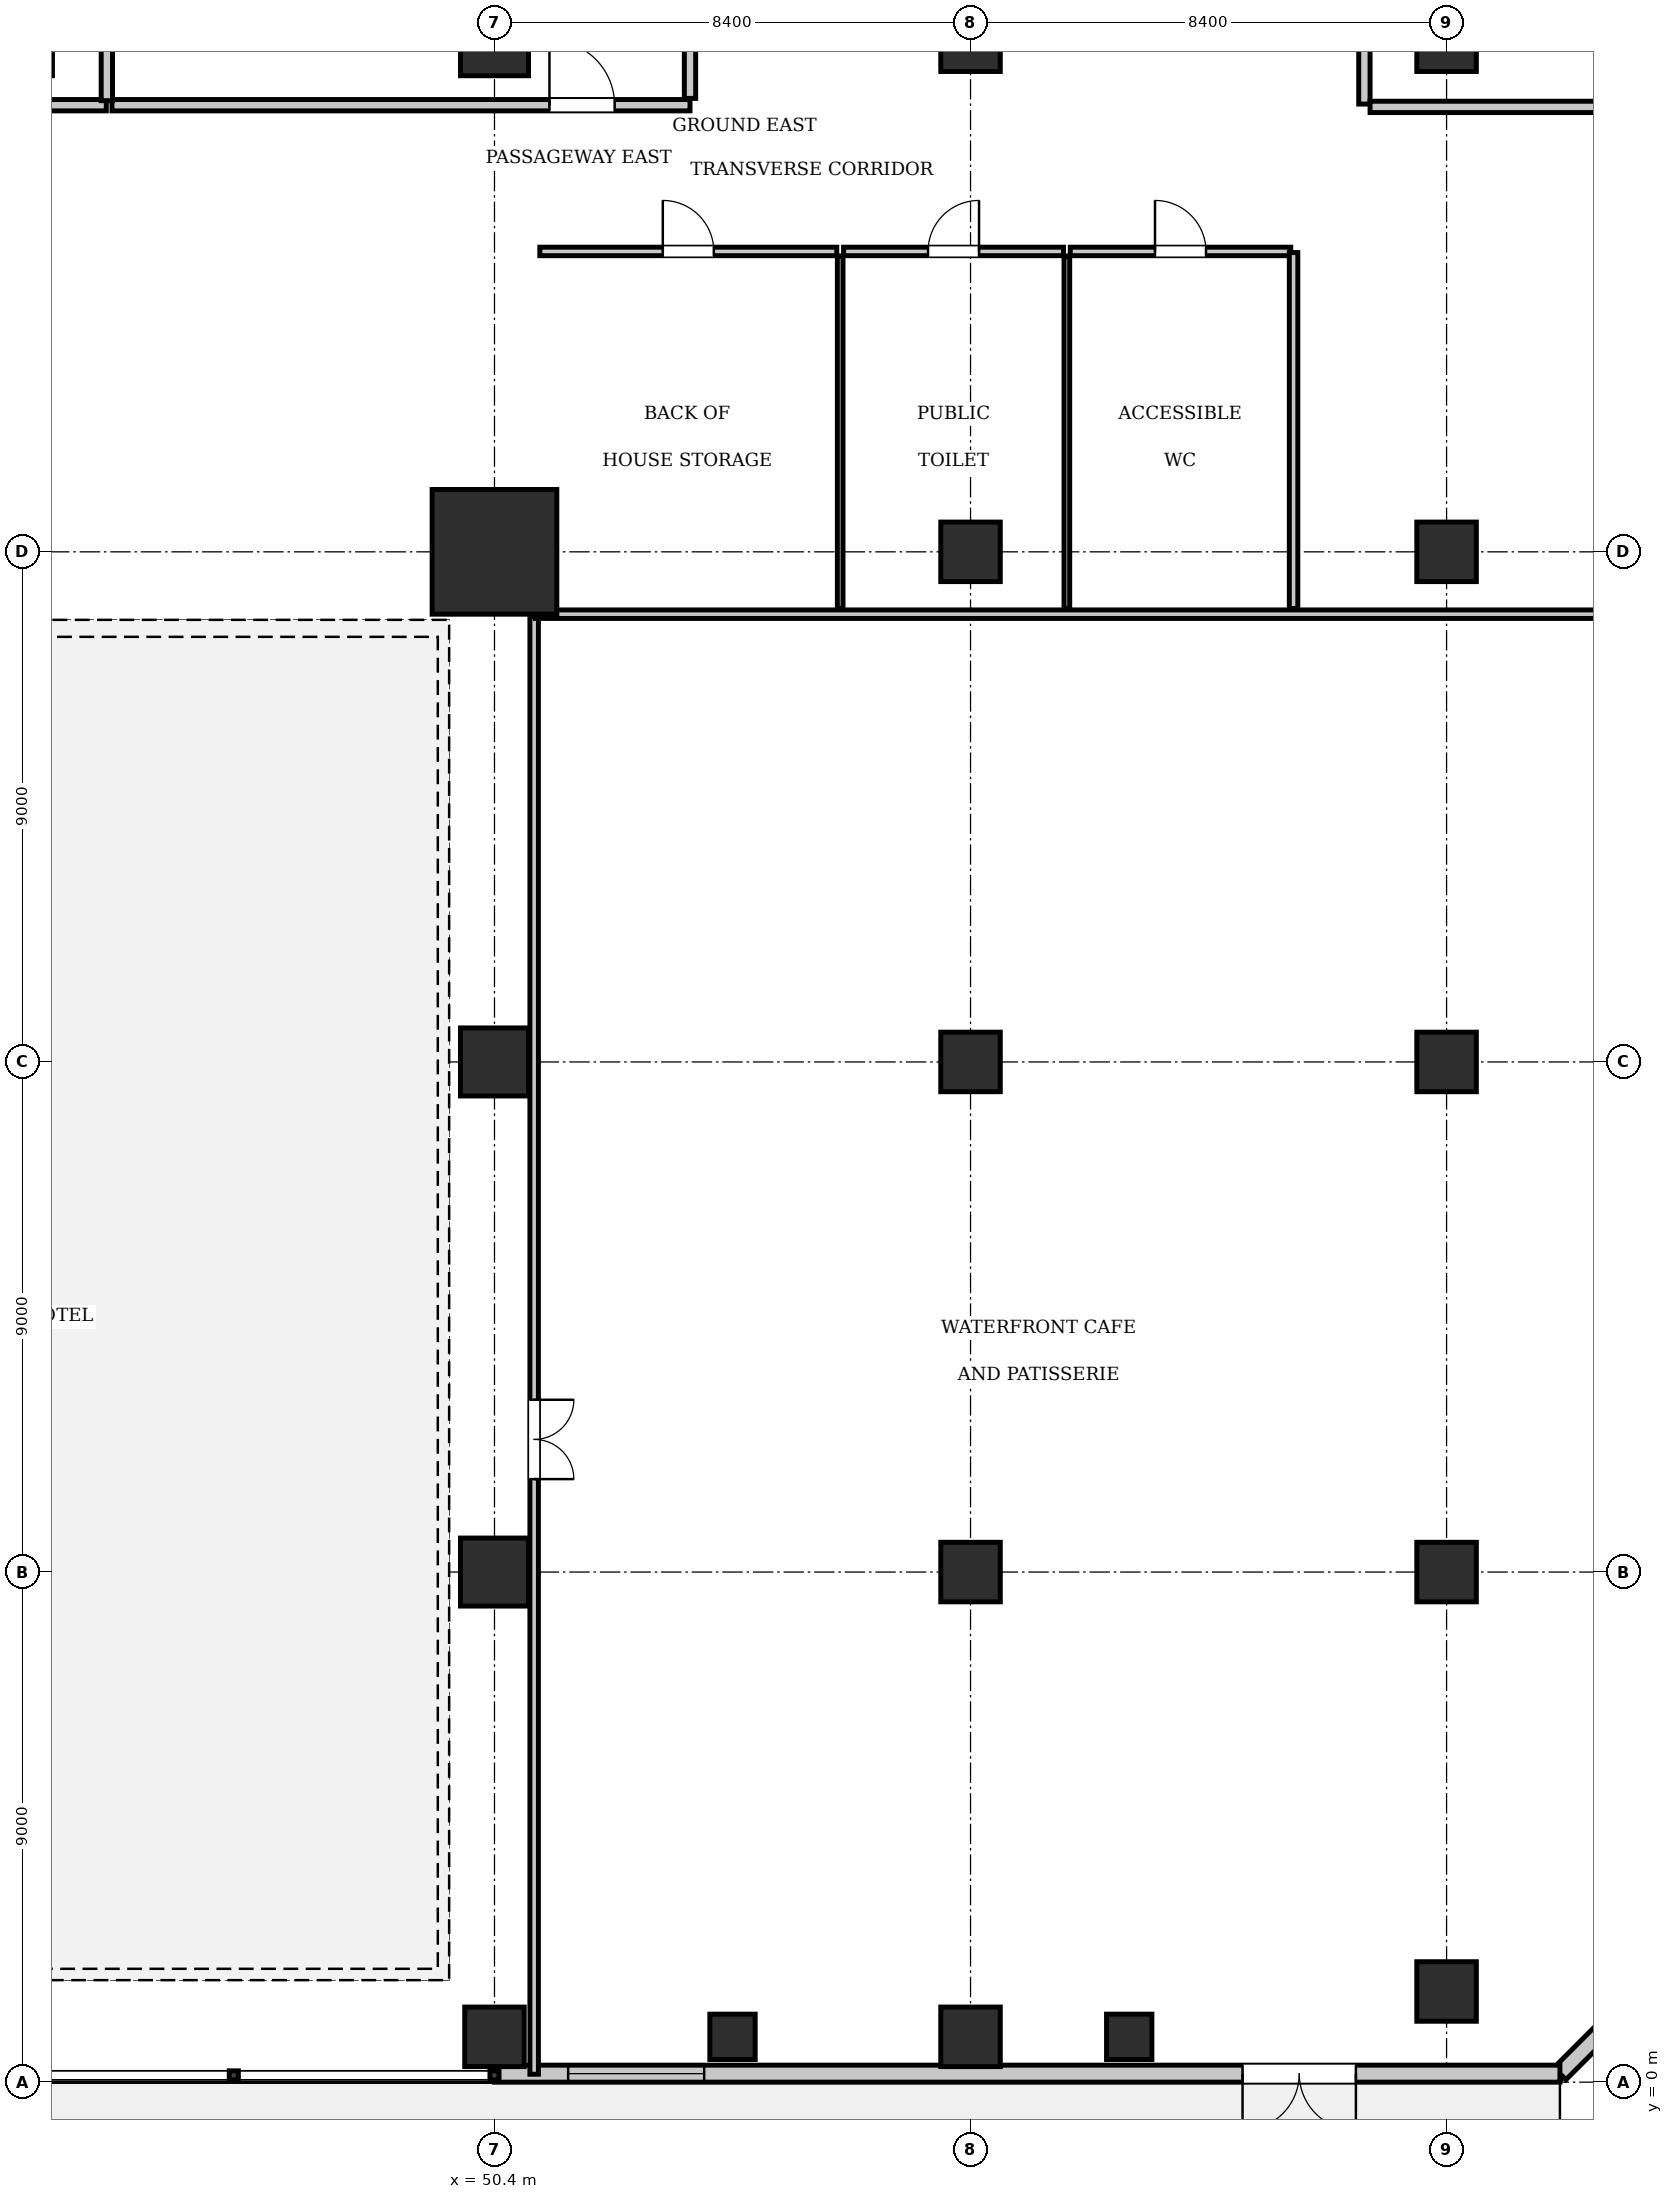
"""IFC4 building model, lengths in metres.
Left out: names, types, materials, properties, quantities, classifications, styles, units other than length and angle.
Written with IfcOpenShell. Run it as: python <this file> out.ifc"""

import sys

from ifc_helpers import new_model, si_unit, direction, frame, frame_2d, origin, origin_2d, place, context, subcontext, project, spatial, rectangle, extrude, element, fill, save


model = new_model("IFC4")
c1 = context("Model", 3, precision=1e-05, world=origin(), true_north=direction((0.0, 1.0)))
c2 = subcontext(c1, "Body", "Model", "MODEL_VIEW")
j1 = project(units=[si_unit("LENGTHUNIT", "METRE"), si_unit("PLANEANGLEUNIT", "RADIAN")], contexts=[c1])
p1 = place(None, origin())
s1 = spatial("IfcSite", under=j1, at=p1, CompositionType="ELEMENT")
p2 = place(p1, origin())
s2 = spatial("IfcBuilding", under=s1, at=p2, CompositionType="ELEMENT")
p3 = place(p2, origin())
s3 = spatial("IfcBuildingStorey", under=s2, at=p3, CompositionType="ELEMENT", Elevation=0.0)
p4 = place(p3, frame((50.4, 27.0, 0.0), z_axis=(0.0, 0.0, 1.0), x_axis=(1.0, 0.0, 0.0)))
e1 = element("IfcColumn", 1, at=p4, inside=s3, PredefinedType="COLUMN", context=c2, shape_type="SweptSolid", body=[
    extrude(rectangle(XDim=2.2, YDim=2.2, at=origin_2d()), origin(), (0.0, 0.0, 1.0), 5.6),
])
for number, where, z_axis, x_axis in (
    (2, (50.4, 36.0, 0.0), (0.0, 0.0, 1.0), (1.0, 0.0, 0.0)),
    (3, (50.4, 18.0, 0.0), (0.0, 0.0, 1.0), (1.0, 0.0, 0.0)),
    (4, (50.4, 9.0, 0.0), (0.0, 0.0, 1.0), (1.0, 0.0, 0.0)),
):
    element("IfcColumn", number, at=place(p3, frame(where, z_axis=z_axis, x_axis=x_axis)), inside=s3, PredefinedType="COLUMN", context=c2, shape_type="SweptSolid", body=[
        extrude(rectangle(XDim=1.2, YDim=1.2, at=origin_2d()), origin(), (0.0, 0.0, 1.0), 5.6),
    ])
for number, where, z_axis, x_axis in (
    (5, (58.8, 9.0, 0.0), (0.0, 0.0, 1.0), (1.0, 0.0, 0.0)),
    (6, (58.8, 18.0, 0.0), (0.0, 0.0, 1.0), (1.0, 0.0, 0.0)),
    (7, (58.8, 27.0, 0.0), (0.0, 0.0, 1.0), (1.0, 0.0, 0.0)),
    (8, (58.8, 36.0, 0.0), (0.0, 0.0, 1.0), (1.0, 0.0, 0.0)),
    (9, (67.2, 1.6, 0.0), (0.0, 0.0, 1.0), (1.0, 0.0, 0.0)),
    (10, (67.2, 9.0, 0.0), (0.0, 0.0, 1.0), (1.0, 0.0, 0.0)),
    (11, (67.2, 18.0, 0.0), (0.0, 0.0, 1.0), (1.0, 0.0, 0.0)),
    (12, (67.2, 27.0, 0.0), (0.0, 0.0, 1.0), (1.0, 0.0, 0.0)),
    (13, (67.2, 36.0, 0.0), (0.0, 0.0, 1.0), (1.0, 0.0, 0.0)),
    (14, (50.4, 0.8, 0.0), (0.0, 0.0, 1.0), (1.0, 0.0, 0.0)),
    (15, (58.8, 0.8, 0.0), (0.0, 0.0, 1.0), (1.0, 0.0, 0.0)),
):
    element("IfcColumn", number, at=place(p3, frame(where, z_axis=z_axis, x_axis=x_axis)), inside=s3, PredefinedType="COLUMN", context=c2, shape_type="SweptSolid", body=[
        extrude(rectangle(XDim=1.05, YDim=1.05, at=origin_2d()), origin(), (0.0, 0.0, 1.0), 5.6),
    ])
for number, where, z_axis, x_axis in (
    (16, (54.6, 0.8, 0.0), (0.0, 0.0, 1.0), (1.0, 0.0, 0.0)),
    (17, (61.6, 0.8, 0.0), (0.0, 0.0, 1.0), (1.0, 0.0, 0.0)),
):
    element("IfcColumn", number, at=place(p3, frame(where, z_axis=z_axis, x_axis=x_axis)), inside=s3, PredefinedType="PILASTER", context=c2, shape_type="SweptSolid", body=[
        extrude(rectangle(XDim=0.8, YDim=0.8, at=origin_2d()), origin(), (0.0, 0.0, 1.0), 5.6),
    ])
p5 = place(p3, frame((69.2, 0.15, 0.0), z_axis=(0.0, 0.0, 1.0), x_axis=(0.707106781187, 0.707106781187, 0.0)))
e18 = element("IfcWall", 18, at=p5, inside=s3, PredefinedType="SOLIDWALL", context=c2, shape_type="SweptSolid", body=[
    extrude(rectangle(XDim=8.839, YDim=0.3, at=frame_2d((4.419, 0.0))), origin(), (0.0, 0.0, 1.0), 5.32),
])
p6 = place(p5, frame((3.2, 0.0, 0.9)))
e19 = element("IfcOpeningElement", 19, at=p6, cuts=e18, PredefinedType="OPENING", context=c2, shape_type="SweptSolid", body=[
    extrude(rectangle(XDim=2.4, YDim=2.6, at=frame_2d((1.2, 1.3))), frame((0.0, 0.16, 0.0), z_axis=(0.0, -1.0, 0.0), x_axis=(1.0, 0.0, 0.0)), (0.0, 0.0, 1.0), 0.32),
])
p7 = place(p3, frame((69.2, 0.15, 0.0), z_axis=(0.0, 0.0, 1.0), x_axis=(-1.0, 0.0, 0.0)))
e20 = element("IfcWall", 20, at=p7, inside=s3, PredefinedType="SOLIDWALL", context=c2, shape_type="SweptSolid", body=[
    extrude(rectangle(XDim=18.8, YDim=0.3, at=frame_2d((9.4, 0.0))), origin(), (0.0, 0.0, 1.0), 5.32),
])
p8 = place(p7, frame((3.6, 0.0, 0.0)))
e21 = element("IfcOpeningElement", 21, at=p8, cuts=e20, PredefinedType="OPENING", context=c2, shape_type="SweptSolid", body=[
    extrude(rectangle(XDim=2.0, YDim=2.4, at=frame_2d((1.0, 1.2))), frame((0.0, 0.16, 0.0), z_axis=(0.0, -1.0, 0.0), x_axis=(1.0, 0.0, 0.0)), (0.0, 0.0, 1.0), 0.32),
])
p9 = place(p7, frame((15.1, 0.0, 0.9)))
e22 = element("IfcOpeningElement", 22, at=p9, cuts=e20, PredefinedType="OPENING", context=c2, shape_type="SweptSolid", body=[
    extrude(rectangle(XDim=2.4, YDim=2.6, at=frame_2d((1.2, 1.3))), frame((0.0, 0.16, 0.0), z_axis=(0.0, -1.0, 0.0), x_axis=(1.0, 0.0, 0.0)), (0.0, 0.0, 1.0), 0.32),
])
p10 = place(p3, frame((43.65, 34.88, 0.0), z_axis=(0.0, 0.0, 1.0), x_axis=(1.0, 0.0, 0.0)))
e23 = element("IfcWall", 23, at=p10, inside=s3, PredefinedType="PARTITIONING", context=c2, shape_type="SweptSolid", body=[
    extrude(rectangle(XDim=10.2, YDim=0.2, at=frame_2d((5.1, 0.0))), origin(), (0.0, 0.0, 1.0), 5.32),
])
p11 = place(p10, frame((7.72, 0.0, 0.0)))
e24 = element("IfcOpeningElement", 24, at=p11, cuts=e23, PredefinedType="OPENING", context=c2, shape_type="SweptSolid", body=[
    extrude(rectangle(XDim=1.15, YDim=2.15, at=frame_2d((0.575, 1.075))), frame((0.0, 0.11, 0.0), z_axis=(0.0, -1.0, 0.0), x_axis=(1.0, 0.0, 0.0)), (0.0, 0.0, 1.0), 0.22),
])
p12 = place(p3, frame((53.85, 35.0, 0.0), z_axis=(0.0, 0.0, 1.0), x_axis=(0.0, 1.0, 0.0)))
e25 = element("IfcWall", 25, at=p12, inside=s3, PredefinedType="PARTITIONING", context=c2, shape_type="SweptSolid", body=[
    extrude(rectangle(XDim=18.7, YDim=0.2, at=frame_2d((9.35, 0.0))), origin(), (0.0, 0.0, 1.0), 5.32),
])
p13 = place(p3, frame((40.4, 34.88, 0.0), z_axis=(0.0, 0.0, 1.0), x_axis=(1.0, 0.0, 0.0)))
e26 = element("IfcWall", 26, at=p13, inside=s3, PredefinedType="PARTITIONING", context=c2, shape_type="SweptSolid", body=[
    extrude(rectangle(XDim=3.15, YDim=0.2, at=frame_2d((1.575, 0.0))), origin(), (0.0, 0.0, 1.0), 5.32),
])
p14 = place(p3, frame((43.56, 34.96, 0.0), z_axis=(0.0, 0.0, 1.0), x_axis=(0.0, 1.0, 0.0)))
e27 = element("IfcWall", 27, at=p14, inside=s3, PredefinedType="PARTITIONING", context=c2, shape_type="SweptSolid", body=[
    extrude(rectangle(XDim=3.16, YDim=0.2, at=frame_2d((1.58, 0.0))), origin(), (0.0, 0.0, 1.0), 5.32),
])
p15 = place(p14, frame((1.67, 0.0, 0.0)))
e28 = element("IfcOpeningElement", 28, at=p15, cuts=e27, PredefinedType="OPENING", context=c2, shape_type="SweptSolid", body=[
    extrude(rectangle(XDim=1.15, YDim=2.15, at=frame_2d((0.575, 1.075))), frame((0.0, 0.11, 0.0), z_axis=(0.0, -1.0, 0.0), x_axis=(1.0, 0.0, 0.0)), (0.0, 0.0, 1.0), 0.22),
])
p16 = place(p3, frame((51.1, 0.14, 0.0), z_axis=(0.0, 0.0, 1.0), x_axis=(0.0, 1.0, 0.0)))
e29 = element("IfcWall", 29, at=p16, inside=s3, PredefinedType="PARTITIONING", context=c2, shape_type="SweptSolid", body=[
    extrude(rectangle(XDim=25.72, YDim=0.15, at=frame_2d((12.86, 0.0))), origin(), (0.0, 0.0, 1.0), 5.32),
])
p17 = place(p16, frame((10.5, 0.0, 0.0)))
e30 = element("IfcOpeningElement", 30, at=p17, cuts=e29, PredefinedType="OPENING", context=c2, shape_type="SweptSolid", body=[
    extrude(rectangle(XDim=1.4, YDim=2.2, at=frame_2d((0.7, 1.1))), frame((0.0, 0.085, 0.0), z_axis=(0.0, -1.0, 0.0), x_axis=(1.0, 0.0, 0.0)), (0.0, 0.0, 1.0), 0.17),
])
p18 = place(p3, frame((51.12, 25.9, 0.0), z_axis=(0.0, 0.0, 1.0), x_axis=(1.0, 0.0, 0.0)))
e31 = element("IfcWall", 31, at=p18, inside=s3, PredefinedType="PARTITIONING", context=c2, shape_type="SweptSolid", body=[
    extrude(rectangle(XDim=24.34, YDim=0.15, at=frame_2d((12.17, 0.0))), origin(), (0.0, 0.0, 1.0), 5.32),
])
p19 = place(p3, frame((51.2, 32.3, 0.0), z_axis=(0.0, 0.0, 1.0), x_axis=(1.0, 0.0, 0.0)))
e32 = element("IfcWall", 32, at=p19, inside=s3, PredefinedType="PARTITIONING", context=c2, shape_type="SweptSolid", body=[
    extrude(rectangle(XDim=5.24, YDim=0.15, at=frame_2d((2.62, 0.0))), origin(), (0.0, 0.0, 1.0), 5.32),
])
p20 = place(p19, frame((2.17, 0.0, 0.0)))
e33 = element("IfcOpeningElement", 33, at=p20, cuts=e32, PredefinedType="OPENING", context=c2, shape_type="SweptSolid", body=[
    extrude(rectangle(XDim=0.9, YDim=2.1, at=frame_2d((0.45, 1.05))), frame((0.0, 0.085, 0.0), z_axis=(0.0, -1.0, 0.0), x_axis=(1.0, 0.0, 0.0)), (0.0, 0.0, 1.0), 0.17),
])
p21 = place(p3, frame((56.56, 32.3, 0.0), z_axis=(0.0, 0.0, 1.0), x_axis=(1.0, 0.0, 0.0)))
e34 = element("IfcWall", 34, at=p21, inside=s3, PredefinedType="PARTITIONING", context=c2, shape_type="SweptSolid", body=[
    extrude(rectangle(XDim=3.88, YDim=0.15, at=frame_2d((1.94, 0.0))), origin(), (0.0, 0.0, 1.0), 5.32),
])
p22 = place(p21, frame((1.49, 0.0, 0.0)))
e35 = element("IfcOpeningElement", 35, at=p22, cuts=e34, PredefinedType="OPENING", context=c2, shape_type="SweptSolid", body=[
    extrude(rectangle(XDim=0.9, YDim=2.1, at=frame_2d((0.45, 1.05))), frame((0.0, 0.085, 0.0), z_axis=(0.0, -1.0, 0.0), x_axis=(1.0, 0.0, 0.0)), (0.0, 0.0, 1.0), 0.17),
])
p23 = place(p3, frame((60.56, 32.3, 0.0), z_axis=(0.0, 0.0, 1.0), x_axis=(1.0, 0.0, 0.0)))
e36 = element("IfcWall", 36, at=p23, inside=s3, PredefinedType="PARTITIONING", context=c2, shape_type="SweptSolid", body=[
    extrude(rectangle(XDim=3.89, YDim=0.15, at=frame_2d((1.945, 0.0))), origin(), (0.0, 0.0, 1.0), 5.32),
])
p24 = place(p23, frame((1.495, 0.0, 0.0)))
e37 = element("IfcOpeningElement", 37, at=p24, cuts=e36, PredefinedType="OPENING", context=c2, shape_type="SweptSolid", body=[
    extrude(rectangle(XDim=0.9, YDim=2.1, at=frame_2d((0.45, 1.05))), frame((0.0, 0.085, 0.0), z_axis=(0.0, -1.0, 0.0), x_axis=(1.0, 0.0, 0.0)), (0.0, 0.0, 1.0), 0.17),
])
for number, where, z_axis, x_axis in (
    (38, (56.5, 26.0, 0.0), (0.0, 0.0, 1.0), (0.0, 1.0, 0.0)),
    (39, (60.5, 26.0, 0.0), (0.0, 0.0, 1.0), (0.0, 1.0, 0.0)),
):
    element("IfcWall", number, at=place(p3, frame(where, z_axis=z_axis, x_axis=x_axis)), inside=s3, PredefinedType="PARTITIONING", context=c2, shape_type="SweptSolid", body=[
        extrude(rectangle(XDim=6.22, YDim=0.1, at=frame_2d((3.11, 0.0))), origin(), (0.0, 0.0, 1.0), 5.32),
    ])
p25 = place(p3, frame((64.5, 26.0, 0.0), z_axis=(0.0, 0.0, 1.0), x_axis=(0.0, 1.0, 0.0)))
e40 = element("IfcWall", 40, at=p25, inside=s3, PredefinedType="PARTITIONING", context=c2, shape_type="SweptSolid", body=[
    extrude(rectangle(XDim=6.28, YDim=0.15, at=frame_2d((3.14, 0.0))), origin(), (0.0, 0.0, 1.0), 5.32),
])
p26 = place(p3, frame((65.75, 34.9, 0.0), z_axis=(0.0, 0.0, 1.0), x_axis=(0.0, 1.0, 0.0)))
e41 = element("IfcWall", 41, at=p26, inside=s3, PredefinedType="PARTITIONING", context=c2, shape_type="SweptSolid", body=[
    extrude(rectangle(XDim=10.0, YDim=0.2, at=frame_2d((5.0, 0.0))), origin(), (0.0, 0.0, 1.0), 5.32),
])
p27 = place(p26, frame((3.5, 0.0, 0.0)))
e42 = element("IfcOpeningElement", 42, at=p27, cuts=e41, PredefinedType="OPENING", context=c2, shape_type="SweptSolid", body=[
    extrude(rectangle(XDim=2.2, YDim=2.4, at=frame_2d((1.1, 1.2))), frame((0.0, 0.11, 0.0), z_axis=(0.0, -1.0, 0.0), x_axis=(1.0, 0.0, 0.0)), (0.0, 0.0, 1.0), 0.22),
])
p28 = place(p3, frame((65.85, 34.85, 0.0), z_axis=(0.0, 0.0, 1.0), x_axis=(1.0, 0.0, 0.0)))
e43 = element("IfcWall", 43, at=p28, inside=s3, PredefinedType="PARTITIONING", context=c2, shape_type="SweptSolid", body=[
    extrude(rectangle(XDim=9.45, YDim=0.2, at=frame_2d((4.725, 0.0))), origin(), (0.0, 0.0, 1.0), 5.32),
])
p29 = place(p8, origin())
e44 = element("IfcDoor", 44, at=p29, inside=s3, OperationType="DOUBLE_DOOR_SINGLE_SWING", PredefinedType="DOOR", context=c2, shape_type="SweptSolid", body=[
    extrude(rectangle(XDim=2.0, YDim=2.4, at=frame_2d((1.0, 1.2))), frame((0.0, 0.025, 0.0), z_axis=(0.0, -1.0, 0.0), x_axis=(1.0, 0.0, 0.0)), (0.0, 0.0, 1.0), 0.05),
])
fill(e21, e44)
p30 = place(p9, origin())
e45 = element("IfcWindow", 45, at=p30, inside=s3, PartitioningType="SINGLE_PANEL", PredefinedType="WINDOW", context=c2, shape_type="SweptSolid", body=[
    extrude(rectangle(XDim=2.4, YDim=2.6, at=frame_2d((1.2, 1.3))), frame((0.0, 0.03, 0.0), z_axis=(0.0, -1.0, 0.0), x_axis=(1.0, 0.0, 0.0)), (0.0, 0.0, 1.0), 0.06),
])
fill(e22, e45)
p31 = place(p11, origin())
e46 = element("IfcDoor", 46, at=p31, inside=s3, OperationType="SINGLE_SWING_LEFT", PredefinedType="DOOR", context=c2, shape_type="SweptSolid", body=[
    extrude(rectangle(XDim=1.15, YDim=2.15, at=frame_2d((0.575, 1.075))), frame((0.0, 0.025, 0.0), z_axis=(0.0, -1.0, 0.0), x_axis=(1.0, 0.0, 0.0)), (0.0, 0.0, 1.0), 0.05),
])
fill(e24, e46)
p32 = place(p17, frame((1.4, 0.0, 0.0), z_axis=(0.0, 0.0, 1.0), x_axis=(-1.0, 0.0, 0.0)))
e47 = element("IfcDoor", 47, at=p32, inside=s3, OperationType="DOUBLE_DOOR_SINGLE_SWING", PredefinedType="DOOR", context=c2, shape_type="SweptSolid", body=[
    extrude(rectangle(XDim=1.4, YDim=2.2, at=frame_2d((0.7, 1.1))), frame((0.0, 0.025, 0.0), z_axis=(0.0, -1.0, 0.0), x_axis=(1.0, 0.0, 0.0)), (0.0, 0.0, 1.0), 0.05),
])
fill(e30, e47)
p33 = place(p20, origin())
e48 = element("IfcDoor", 48, at=p33, inside=s3, OperationType="SINGLE_SWING_LEFT", PredefinedType="DOOR", context=c2, shape_type="SweptSolid", body=[
    extrude(rectangle(XDim=0.9, YDim=2.1, at=frame_2d((0.45, 1.05))), frame((0.0, 0.025, 0.0), z_axis=(0.0, -1.0, 0.0), x_axis=(1.0, 0.0, 0.0)), (0.0, 0.0, 1.0), 0.05),
])
fill(e33, e48)
p34 = place(p22, origin())
e49 = element("IfcDoor", 49, at=p34, inside=s3, OperationType="SINGLE_SWING_RIGHT", PredefinedType="DOOR", context=c2, shape_type="SweptSolid", body=[
    extrude(rectangle(XDim=0.9, YDim=2.1, at=frame_2d((0.45, 1.05))), frame((0.0, 0.025, 0.0), z_axis=(0.0, -1.0, 0.0), x_axis=(1.0, 0.0, 0.0)), (0.0, 0.0, 1.0), 0.05),
])
fill(e35, e49)
p35 = place(p24, origin())
e50 = element("IfcDoor", 50, at=p35, inside=s3, OperationType="SINGLE_SWING_LEFT", PredefinedType="DOOR", context=c2, shape_type="SweptSolid", body=[
    extrude(rectangle(XDim=0.9, YDim=2.1, at=frame_2d((0.45, 1.05))), frame((0.0, 0.025, 0.0), z_axis=(0.0, -1.0, 0.0), x_axis=(1.0, 0.0, 0.0)), (0.0, 0.0, 1.0), 0.05),
])
fill(e37, e50)
save(model, sys.argv[1])
